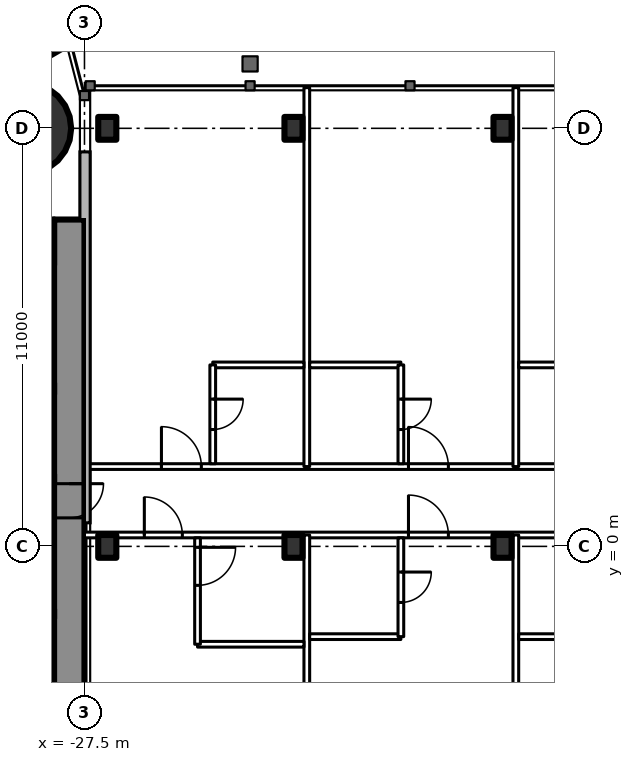
"""IFC4 building model, lengths in metres.
Left out: names, types, materials, properties, quantities, classifications, styles, units other than length and angle.
Written with IfcOpenShell. Run it as: python <this file> out.ifc"""

import sys

from ifc_helpers import new_model, si_unit, direction, frame, frame_2d, origin, origin_2d, place, context, subcontext, project, spatial, rectangle, circle, i_section, extrude, element, fill, save


model = new_model("IFC4")
c1 = context("Model", 3, precision=1e-05, world=origin(), true_north=direction((0.0, 1.0)))
c2 = subcontext(c1, "Body", "Model", "MODEL_VIEW")
j1 = project(units=[si_unit("LENGTHUNIT", "METRE"), si_unit("PLANEANGLEUNIT", "RADIAN")], contexts=[c1])
p1 = place(None, origin())
s1 = spatial("IfcSite", under=j1, at=p1, CompositionType="ELEMENT")
p2 = place(p1, origin())
s2 = spatial("IfcBuilding", under=s1, at=p2, CompositionType="ELEMENT")
p3 = place(p2, frame((0.0, 0.0, 218.9)))
s3 = spatial("IfcBuildingStorey", under=s2, at=p3, CompositionType="ELEMENT", Elevation=218.9)
p4 = place(p3, frame((-29.05, 11.0, 0.0), z_axis=(0.0, 0.0, 1.0), x_axis=(1.0, 0.0, 0.0)))
e1 = element("IfcColumn", 1, at=p4, inside=s3, PredefinedType="COLUMN", context=c2, shape_type="SweptSolid", body=[
    extrude(circle(Radius=1.2, at=origin_2d()), origin(), (0.0, 0.0, 1.0), 3.6),
])
p5 = place(p3, frame((-27.9, 8.6, 0.0), z_axis=(0.0, 0.0, 1.0), x_axis=(0.0, -1.0, 0.0)))
e2 = element("IfcWall", 2, at=p5, inside=s3, PredefinedType="SHEAR", context=c2, shape_type="SweptSolid", body=[
    extrude(rectangle(XDim=17.2, YDim=0.8, at=frame_2d((8.6, 0.0))), origin(), (0.0, 0.0, 1.0), 3.6),
])
p6 = place(p5, frame((6.95, 0.0, 0.0)))
e3 = element("IfcOpeningElement", 3, at=p6, cuts=e2, PredefinedType="OPENING", context=c2, shape_type="SweptSolid", body=[
    extrude(rectangle(XDim=0.9, YDim=2.2, at=frame_2d((0.45, 1.1))), frame((0.0, 0.41, 0.0), z_axis=(0.0, -1.0, 0.0), x_axis=(1.0, 0.0, 0.0)), (0.0, 0.0, 1.0), 0.82),
])
p7 = place(p3, frame((-28.3, 8.0, 0.0), z_axis=(0.0, 0.0, 1.0), x_axis=(-1.0, 0.0, 0.0)))
e4 = element("IfcWall", 4, at=p7, inside=s3, PredefinedType="SHEAR", context=c2, shape_type="SweptSolid", body=[
    extrude(rectangle(XDim=8.4, YDim=1.2, at=frame_2d((4.2, 0.0))), origin(), (0.0, 0.0, 1.0), 3.6),
])
p8 = place(p7, frame((0.25, 0.0, 0.0)))
e5 = element("IfcOpeningElement", 5, at=p8, cuts=e4, PredefinedType="OPENING", context=c2, shape_type="SweptSolid", body=[
    extrude(rectangle(XDim=1.0, YDim=2.2, at=frame_2d((0.5, 1.1))), frame((0.0, 0.61, 0.0), z_axis=(0.0, -1.0, 0.0), x_axis=(1.0, 0.0, 0.0)), (0.0, 0.0, 1.0), 1.22),
])
p9 = place(p3, frame((-28.3, 4.15, 0.0), z_axis=(0.0, 0.0, 1.0), x_axis=(-1.0, 0.0, 0.0)))
e6 = element("IfcWall", 6, at=p9, inside=s3, PredefinedType="SHEAR", context=c2, shape_type="SweptSolid", body=[
    extrude(rectangle(XDim=8.4, YDim=0.3, at=frame_2d((4.2, 0.0))), origin(), (0.0, 0.0, 1.0), 3.6),
])
for number, where, z_axis, x_axis in (
    (7, (-28.3, 1.775, 0.0), (0.0, 0.0, 1.0), (-1.0, 0.0, 0.0)),
    (8, (-28.3, -1.775, 0.0), (0.0, 0.0, 1.0), (-1.0, 0.0, 0.0)),
):
    element("IfcWall", number, at=place(p3, frame(where, z_axis=z_axis, x_axis=x_axis)), inside=s3, PredefinedType="SHEAR", context=c2, shape_type="SweptSolid", body=[
        extrude(rectangle(XDim=2.9, YDim=0.25, at=frame_2d((1.45, 0.0))), origin(), (0.0, 0.0, 1.0), 3.6),
    ])
p10 = place(p3, frame((-27.2, 14.3, 0.0), z_axis=(0.0, 0.0, 1.0), x_axis=(-0.866026593062, -0.499997940104, 0.0)))
e9 = element("IfcWall", 9, at=p10, inside=s3, PredefinedType="SHEAR", context=c2, shape_type="SweptSolid", body=[
    extrude(rectangle(XDim=28.946, YDim=1.2, at=frame_2d((14.473, 0.0))), origin(), (0.0, 0.0, 1.0), 3.6),
])
p11 = place(p10, frame((4.6, 0.0, 0.0)))
e10 = element("IfcOpeningElement", 10, at=p11, cuts=e9, PredefinedType="OPENING", context=c2, shape_type="SweptSolid", body=[
    extrude(rectangle(XDim=1.0, YDim=2.2, at=frame_2d((0.5, 1.1))), frame((0.0, 0.61, 0.0), z_axis=(0.0, -1.0, 0.0), x_axis=(1.0, 0.0, 0.0)), (0.0, 0.0, 1.0), 1.22),
])
p12 = place(p10, frame((13.395, 0.0, 0.0)))
e11 = element("IfcOpeningElement", 11, at=p12, cuts=e9, PredefinedType="OPENING", context=c2, shape_type="SweptSolid", body=[
    extrude(rectangle(XDim=1.8, YDim=2.2, at=frame_2d((0.9, 1.1))), frame((0.0, 0.61, 0.0), z_axis=(0.0, -1.0, 0.0), x_axis=(1.0, 0.0, 0.0)), (0.0, 0.0, 1.0), 1.22),
])
p13 = place(p3, frame((-27.2, -14.3, 0.0), z_axis=(0.0, 0.0, 1.0), x_axis=(-0.866024021859, 0.500002393557, 0.0)))
e12 = element("IfcWall", 12, at=p13, inside=s3, PredefinedType="SHEAR", context=c2, shape_type="SweptSolid", body=[
    extrude(rectangle(XDim=27.907, YDim=1.2, at=frame_2d((13.954, 0.0))), origin(), (0.0, 0.0, 1.0), 3.6),
])
p14 = place(p13, frame((4.6, 0.0, 0.0)))
e13 = element("IfcOpeningElement", 13, at=p14, cuts=e12, PredefinedType="OPENING", context=c2, shape_type="SweptSolid", body=[
    extrude(rectangle(XDim=1.0, YDim=2.2, at=frame_2d((0.5, 1.1))), frame((0.0, 0.61, 0.0), z_axis=(0.0, -1.0, 0.0), x_axis=(1.0, 0.0, 0.0)), (0.0, 0.0, 1.0), 1.22),
])
p15 = place(p13, frame((13.395, 0.0, 0.0)))
e14 = element("IfcOpeningElement", 14, at=p15, cuts=e12, PredefinedType="OPENING", context=c2, shape_type="SweptSolid", body=[
    extrude(rectangle(XDim=1.8, YDim=2.2, at=frame_2d((0.9, 1.1))), frame((0.0, 0.61, 0.0), z_axis=(0.0, -1.0, 0.0), x_axis=(1.0, 0.0, 0.0)), (0.0, 0.0, 1.0), 1.22),
])
for number, where, z_axis, x_axis in (
    (15, (-26.9, 0.0, 0.0), (0.0, 0.0, 1.0), (1.0, 0.0, 0.0)),
    (16, (-22.0, 0.0, 0.0), (0.0, 0.0, 1.0), (1.0, 0.0, 0.0)),
    (17, (-16.5, 0.0, 0.0), (0.0, 0.0, 1.0), (1.0, 0.0, 0.0)),
    (18, (-26.9, 11.0, 0.0), (0.0, 0.0, 1.0), (1.0, 0.0, 0.0)),
    (19, (-22.0, 11.0, 0.0), (0.0, 0.0, 1.0), (1.0, 0.0, 0.0)),
    (20, (-16.5, 11.0, 0.0), (0.0, 0.0, 1.0), (1.0, 0.0, 0.0)),
):
    element("IfcColumn", number, at=place(p3, frame(where, z_axis=z_axis, x_axis=x_axis)), inside=s3, PredefinedType="COLUMN", context=c2, shape_type="SweptSolid", body=[
        extrude(i_section(OverallWidth=0.476, OverallDepth=0.6, WebThickness=0.1, FlangeThickness=0.14, FilletRadius=0.02, at=origin_2d()), origin(), (0.0, 0.0, 1.0), 3.6),
    ])
p16 = place(p3, frame((-27.5, 0.3, 0.0), z_axis=(0.0, 0.0, 1.0), x_axis=(1.0, 0.0, 0.0)))
e21 = element("IfcWall", 21, at=p16, inside=s3, PredefinedType="PARTITIONING", context=c2, shape_type="SweptSolid", body=[
    extrude(rectangle(XDim=55.0, YDim=0.15, at=frame_2d((27.5, 0.0))), origin(), (0.0, 0.0, 1.0), 2.4),
])
p17 = place(p16, frame((1.575, 0.0, 0.0)))
e22 = element("IfcOpeningElement", 22, at=p17, cuts=e21, PredefinedType="OPENING", context=c2, shape_type="SweptSolid", body=[
    extrude(rectangle(XDim=1.0, YDim=2.2, at=frame_2d((0.5, 1.1))), frame((0.0, 0.085, 0.0), z_axis=(0.0, -1.0, 0.0), x_axis=(1.0, 0.0, 0.0)), (0.0, 0.0, 1.0), 0.17),
])
p18 = place(p16, frame((8.525, 0.0, 0.0)))
e23 = element("IfcOpeningElement", 23, at=p18, cuts=e21, PredefinedType="OPENING", context=c2, shape_type="SweptSolid", body=[
    extrude(rectangle(XDim=1.05, YDim=2.4, at=frame_2d((0.525, 1.2))), frame((0.0, 0.085, 0.0), z_axis=(0.0, -1.0, 0.0), x_axis=(1.0, 0.0, 0.0)), (0.0, 0.0, 1.0), 0.17),
])
p19 = place(p16, frame((14.025, 0.0, 0.0)))
e24 = element("IfcOpeningElement", 24, at=p19, cuts=e21, PredefinedType="OPENING", context=c2, shape_type="SweptSolid", body=[
    extrude(rectangle(XDim=1.05, YDim=2.4, at=frame_2d((0.525, 1.2))), frame((0.0, 0.085, 0.0), z_axis=(0.0, -1.0, 0.0), x_axis=(1.0, 0.0, 0.0)), (0.0, 0.0, 1.0), 0.17),
])
p20 = place(p16, frame((19.525, 0.0, 0.0)))
e25 = element("IfcOpeningElement", 25, at=p20, cuts=e21, PredefinedType="OPENING", context=c2, shape_type="SweptSolid", body=[
    extrude(rectangle(XDim=1.05, YDim=2.4, at=frame_2d((0.525, 1.2))), frame((0.0, 0.085, 0.0), z_axis=(0.0, -1.0, 0.0), x_axis=(1.0, 0.0, 0.0)), (0.0, 0.0, 1.0), 0.17),
])
p21 = place(p16, frame((25.025, 0.0, 0.0)))
e26 = element("IfcOpeningElement", 26, at=p21, cuts=e21, PredefinedType="OPENING", context=c2, shape_type="SweptSolid", body=[
    extrude(rectangle(XDim=1.05, YDim=2.4, at=frame_2d((0.525, 1.2))), frame((0.0, 0.085, 0.0), z_axis=(0.0, -1.0, 0.0), x_axis=(1.0, 0.0, 0.0)), (0.0, 0.0, 1.0), 0.17),
])
p22 = place(p16, frame((30.525, 0.0, 0.0)))
e27 = element("IfcOpeningElement", 27, at=p22, cuts=e21, PredefinedType="OPENING", context=c2, shape_type="SweptSolid", body=[
    extrude(rectangle(XDim=1.05, YDim=2.4, at=frame_2d((0.525, 1.2))), frame((0.0, 0.085, 0.0), z_axis=(0.0, -1.0, 0.0), x_axis=(1.0, 0.0, 0.0)), (0.0, 0.0, 1.0), 0.17),
])
p23 = place(p16, frame((36.025, 0.0, 0.0)))
e28 = element("IfcOpeningElement", 28, at=p23, cuts=e21, PredefinedType="OPENING", context=c2, shape_type="SweptSolid", body=[
    extrude(rectangle(XDim=1.05, YDim=2.4, at=frame_2d((0.525, 1.2))), frame((0.0, 0.085, 0.0), z_axis=(0.0, -1.0, 0.0), x_axis=(1.0, 0.0, 0.0)), (0.0, 0.0, 1.0), 0.17),
])
p24 = place(p16, frame((41.525, 0.0, 0.0)))
e29 = element("IfcOpeningElement", 29, at=p24, cuts=e21, PredefinedType="OPENING", context=c2, shape_type="SweptSolid", body=[
    extrude(rectangle(XDim=1.05, YDim=2.4, at=frame_2d((0.525, 1.2))), frame((0.0, 0.085, 0.0), z_axis=(0.0, -1.0, 0.0), x_axis=(1.0, 0.0, 0.0)), (0.0, 0.0, 1.0), 0.17),
])
p25 = place(p16, frame((47.025, 0.0, 0.0)))
e30 = element("IfcOpeningElement", 30, at=p25, cuts=e21, PredefinedType="OPENING", context=c2, shape_type="SweptSolid", body=[
    extrude(rectangle(XDim=1.05, YDim=2.4, at=frame_2d((0.525, 1.2))), frame((0.0, 0.085, 0.0), z_axis=(0.0, -1.0, 0.0), x_axis=(1.0, 0.0, 0.0)), (0.0, 0.0, 1.0), 0.17),
])
p26 = place(p16, frame((52.525, 0.0, 0.0)))
e31 = element("IfcOpeningElement", 31, at=p26, cuts=e21, PredefinedType="OPENING", context=c2, shape_type="SweptSolid", body=[
    extrude(rectangle(XDim=1.05, YDim=2.4, at=frame_2d((0.525, 1.2))), frame((0.0, 0.085, 0.0), z_axis=(0.0, -1.0, 0.0), x_axis=(1.0, 0.0, 0.0)), (0.0, 0.0, 1.0), 0.17),
])
p27 = place(p3, frame((-27.5, 2.1, 0.0), z_axis=(0.0, 0.0, 1.0), x_axis=(1.0, 0.0, 0.0)))
e32 = element("IfcWall", 32, at=p27, inside=s3, PredefinedType="PARTITIONING", context=c2, shape_type="SweptSolid", body=[
    extrude(rectangle(XDim=55.0, YDim=0.15, at=frame_2d((27.5, 0.0))), origin(), (0.0, 0.0, 1.0), 3.4),
])
p28 = place(p27, frame((2.025, 0.0, 0.0)))
e33 = element("IfcOpeningElement", 33, at=p28, cuts=e32, PredefinedType="OPENING", context=c2, shape_type="SweptSolid", body=[
    extrude(rectangle(XDim=1.05, YDim=2.4, at=frame_2d((0.525, 1.2))), frame((0.0, 0.085, 0.0), z_axis=(0.0, -1.0, 0.0), x_axis=(1.0, 0.0, 0.0)), (0.0, 0.0, 1.0), 0.17),
])
p29 = place(p27, frame((8.525, 0.0, 0.0)))
e34 = element("IfcOpeningElement", 34, at=p29, cuts=e32, PredefinedType="OPENING", context=c2, shape_type="SweptSolid", body=[
    extrude(rectangle(XDim=1.05, YDim=2.4, at=frame_2d((0.525, 1.2))), frame((0.0, 0.085, 0.0), z_axis=(0.0, -1.0, 0.0), x_axis=(1.0, 0.0, 0.0)), (0.0, 0.0, 1.0), 0.17),
])
p30 = place(p27, frame((14.025, 0.0, 0.0)))
e35 = element("IfcOpeningElement", 35, at=p30, cuts=e32, PredefinedType="OPENING", context=c2, shape_type="SweptSolid", body=[
    extrude(rectangle(XDim=1.05, YDim=2.4, at=frame_2d((0.525, 1.2))), frame((0.0, 0.085, 0.0), z_axis=(0.0, -1.0, 0.0), x_axis=(1.0, 0.0, 0.0)), (0.0, 0.0, 1.0), 0.17),
])
p31 = place(p27, frame((19.525, 0.0, 0.0)))
e36 = element("IfcOpeningElement", 36, at=p31, cuts=e32, PredefinedType="OPENING", context=c2, shape_type="SweptSolid", body=[
    extrude(rectangle(XDim=1.05, YDim=2.4, at=frame_2d((0.525, 1.2))), frame((0.0, 0.085, 0.0), z_axis=(0.0, -1.0, 0.0), x_axis=(1.0, 0.0, 0.0)), (0.0, 0.0, 1.0), 0.17),
])
p32 = place(p27, frame((25.025, 0.0, 0.0)))
e37 = element("IfcOpeningElement", 37, at=p32, cuts=e32, PredefinedType="OPENING", context=c2, shape_type="SweptSolid", body=[
    extrude(rectangle(XDim=1.05, YDim=2.4, at=frame_2d((0.525, 1.2))), frame((0.0, 0.085, 0.0), z_axis=(0.0, -1.0, 0.0), x_axis=(1.0, 0.0, 0.0)), (0.0, 0.0, 1.0), 0.17),
])
p33 = place(p27, frame((30.525, 0.0, 0.0)))
e38 = element("IfcOpeningElement", 38, at=p33, cuts=e32, PredefinedType="OPENING", context=c2, shape_type="SweptSolid", body=[
    extrude(rectangle(XDim=1.05, YDim=2.4, at=frame_2d((0.525, 1.2))), frame((0.0, 0.085, 0.0), z_axis=(0.0, -1.0, 0.0), x_axis=(1.0, 0.0, 0.0)), (0.0, 0.0, 1.0), 0.17),
])
p34 = place(p27, frame((36.025, 0.0, 0.0)))
e39 = element("IfcOpeningElement", 39, at=p34, cuts=e32, PredefinedType="OPENING", context=c2, shape_type="SweptSolid", body=[
    extrude(rectangle(XDim=1.05, YDim=2.4, at=frame_2d((0.525, 1.2))), frame((0.0, 0.085, 0.0), z_axis=(0.0, -1.0, 0.0), x_axis=(1.0, 0.0, 0.0)), (0.0, 0.0, 1.0), 0.17),
])
p35 = place(p27, frame((41.525, 0.0, 0.0)))
e40 = element("IfcOpeningElement", 40, at=p35, cuts=e32, PredefinedType="OPENING", context=c2, shape_type="SweptSolid", body=[
    extrude(rectangle(XDim=1.05, YDim=2.4, at=frame_2d((0.525, 1.2))), frame((0.0, 0.085, 0.0), z_axis=(0.0, -1.0, 0.0), x_axis=(1.0, 0.0, 0.0)), (0.0, 0.0, 1.0), 0.17),
])
p36 = place(p27, frame((47.025, 0.0, 0.0)))
e41 = element("IfcOpeningElement", 41, at=p36, cuts=e32, PredefinedType="OPENING", context=c2, shape_type="SweptSolid", body=[
    extrude(rectangle(XDim=1.05, YDim=2.4, at=frame_2d((0.525, 1.2))), frame((0.0, 0.085, 0.0), z_axis=(0.0, -1.0, 0.0), x_axis=(1.0, 0.0, 0.0)), (0.0, 0.0, 1.0), 0.17),
])
p37 = place(p27, frame((52.525, 0.0, 0.0)))
e42 = element("IfcOpeningElement", 42, at=p37, cuts=e32, PredefinedType="OPENING", context=c2, shape_type="SweptSolid", body=[
    extrude(rectangle(XDim=1.05, YDim=2.4, at=frame_2d((0.525, 1.2))), frame((0.0, 0.085, 0.0), z_axis=(0.0, -1.0, 0.0), x_axis=(1.0, 0.0, 0.0)), (0.0, 0.0, 1.0), 0.17),
])
for number, where, z_axis, x_axis in (
    (43, (-21.65, -12.07, 0.0), (0.0, 0.0, 1.0), (0.0, 1.0, 0.0)),
    (44, (-16.15, -12.07, 0.0), (0.0, 0.0, 1.0), (0.0, 1.0, 0.0)),
):
    element("IfcWall", number, at=place(p3, frame(where, z_axis=z_axis, x_axis=x_axis)), inside=s3, PredefinedType="PARTITIONING", context=c2, shape_type="SweptSolid", body=[
        extrude(rectangle(XDim=12.37, YDim=0.15, at=frame_2d((6.185, 0.0))), origin(), (0.0, 0.0, 1.0), 3.4),
    ])
p38 = place(p3, frame((-24.525, -2.575, 0.0), z_axis=(0.0, 0.0, 1.0), x_axis=(1.0, 0.0, 0.0)))
e45 = element("IfcWall", 45, at=p38, inside=s3, PredefinedType="PARTITIONING", context=c2, shape_type="SweptSolid", body=[
    extrude(rectangle(XDim=2.8, YDim=0.15, at=frame_2d((1.4, 0.0))), origin(), (0.0, 0.0, 1.0), 3.4),
])
p39 = place(p3, frame((-24.525, -2.575, 0.0), z_axis=(0.0, 0.0, 1.0), x_axis=(0.0, 1.0, 0.0)))
e46 = element("IfcWall", 46, at=p39, inside=s3, PredefinedType="PARTITIONING", context=c2, shape_type="SweptSolid", body=[
    extrude(rectangle(XDim=2.8, YDim=0.15, at=frame_2d((1.4, 0.0))), origin(), (0.0, 0.0, 1.0), 3.4),
])
p40 = place(p39, frame((1.55, 0.0, 0.0)))
e47 = element("IfcOpeningElement", 47, at=p40, cuts=e46, PredefinedType="OPENING", context=c2, shape_type="SweptSolid", body=[
    extrude(rectangle(XDim=1.0, YDim=2.2, at=frame_2d((0.5, 1.1))), frame((0.0, 0.085, 0.0), z_axis=(0.0, -1.0, 0.0), x_axis=(1.0, 0.0, 0.0)), (0.0, 0.0, 1.0), 0.17),
])
p41 = place(p3, frame((-21.575, -2.375, 0.0), z_axis=(0.0, 0.0, 1.0), x_axis=(1.0, 0.0, 0.0)))
e48 = element("IfcWall", 48, at=p41, inside=s3, PredefinedType="PARTITIONING", context=c2, shape_type="SweptSolid", body=[
    extrude(rectangle(XDim=2.4, YDim=0.15, at=frame_2d((1.2, 0.0))), origin(), (0.0, 0.0, 1.0), 3.4),
])
p42 = place(p3, frame((-19.175, -2.375, 0.0), z_axis=(0.0, 0.0, 1.0), x_axis=(0.0, 1.0, 0.0)))
e49 = element("IfcWall", 49, at=p42, inside=s3, PredefinedType="PARTITIONING", context=c2, shape_type="SweptSolid", body=[
    extrude(rectangle(XDim=2.6, YDim=0.15, at=frame_2d((1.3, 0.0))), origin(), (0.0, 0.0, 1.0), 3.4),
])
p43 = place(p42, frame((0.9, 0.0, 0.0)))
e50 = element("IfcOpeningElement", 50, at=p43, cuts=e49, PredefinedType="OPENING", context=c2, shape_type="SweptSolid", body=[
    extrude(rectangle(XDim=0.8, YDim=2.2, at=frame_2d((0.4, 1.1))), frame((0.0, 0.085, 0.0), z_axis=(0.0, -1.0, 0.0), x_axis=(1.0, 0.0, 0.0)), (0.0, 0.0, 1.0), 0.17),
])
p44 = place(p3, frame((-16.075, -2.375, 0.0), z_axis=(0.0, 0.0, 1.0), x_axis=(1.0, 0.0, 0.0)))
e51 = element("IfcWall", 51, at=p44, inside=s3, PredefinedType="PARTITIONING", context=c2, shape_type="SweptSolid", body=[
    extrude(rectangle(XDim=2.4, YDim=0.15, at=frame_2d((1.2, 0.0))), origin(), (0.0, 0.0, 1.0), 3.4),
])
for number, where, z_axis, x_axis in (
    (52, (-21.65, 2.1, 0.0), (0.0, 0.0, 1.0), (0.0, 1.0, 0.0)),
    (53, (-16.15, 2.1, 0.0), (0.0, 0.0, 1.0), (0.0, 1.0, 0.0)),
):
    element("IfcWall", number, at=place(p3, frame(where, z_axis=z_axis, x_axis=x_axis)), inside=s3, PredefinedType="PARTITIONING", context=c2, shape_type="SweptSolid", body=[
        extrude(rectangle(XDim=9.97, YDim=0.15, at=frame_2d((4.985, 0.0))), origin(), (0.0, 0.0, 1.0), 3.4),
    ])
p45 = place(p3, frame((-24.125, 4.775, 0.0), z_axis=(0.0, 0.0, 1.0), x_axis=(1.0, 0.0, 0.0)))
e54 = element("IfcWall", 54, at=p45, inside=s3, PredefinedType="PARTITIONING", context=c2, shape_type="SweptSolid", body=[
    extrude(rectangle(XDim=2.4, YDim=0.15, at=frame_2d((1.2, 0.0))), origin(), (0.0, 0.0, 1.0), 3.4),
])
p46 = place(p3, frame((-24.125, 2.175, 0.0), z_axis=(0.0, 0.0, 1.0), x_axis=(0.0, 1.0, 0.0)))
e55 = element("IfcWall", 55, at=p46, inside=s3, PredefinedType="PARTITIONING", context=c2, shape_type="SweptSolid", body=[
    extrude(rectangle(XDim=2.6, YDim=0.15, at=frame_2d((1.3, 0.0))), origin(), (0.0, 0.0, 1.0), 3.4),
])
p47 = place(p46, frame((0.9, 0.0, 0.0)))
e56 = element("IfcOpeningElement", 56, at=p47, cuts=e55, PredefinedType="OPENING", context=c2, shape_type="SweptSolid", body=[
    extrude(rectangle(XDim=0.8, YDim=2.2, at=frame_2d((0.4, 1.1))), frame((0.0, 0.085, 0.0), z_axis=(0.0, -1.0, 0.0), x_axis=(1.0, 0.0, 0.0)), (0.0, 0.0, 1.0), 0.17),
])
p48 = place(p3, frame((-21.575, 4.775, 0.0), z_axis=(0.0, 0.0, 1.0), x_axis=(1.0, 0.0, 0.0)))
e57 = element("IfcWall", 57, at=p48, inside=s3, PredefinedType="PARTITIONING", context=c2, shape_type="SweptSolid", body=[
    extrude(rectangle(XDim=2.4, YDim=0.15, at=frame_2d((1.2, 0.0))), origin(), (0.0, 0.0, 1.0), 3.4),
])
p49 = place(p3, frame((-19.175, 2.175, 0.0), z_axis=(0.0, 0.0, 1.0), x_axis=(0.0, 1.0, 0.0)))
e58 = element("IfcWall", 58, at=p49, inside=s3, PredefinedType="PARTITIONING", context=c2, shape_type="SweptSolid", body=[
    extrude(rectangle(XDim=2.6, YDim=0.15, at=frame_2d((1.3, 0.0))), origin(), (0.0, 0.0, 1.0), 3.4),
])
p50 = place(p49, frame((0.9, 0.0, 0.0)))
e59 = element("IfcOpeningElement", 59, at=p50, cuts=e58, PredefinedType="OPENING", context=c2, shape_type="SweptSolid", body=[
    extrude(rectangle(XDim=0.8, YDim=2.2, at=frame_2d((0.4, 1.1))), frame((0.0, 0.085, 0.0), z_axis=(0.0, -1.0, 0.0), x_axis=(1.0, 0.0, 0.0)), (0.0, 0.0, 1.0), 0.17),
])
p51 = place(p3, frame((-16.075, 4.775, 0.0), z_axis=(0.0, 0.0, 1.0), x_axis=(1.0, 0.0, 0.0)))
e60 = element("IfcWall", 60, at=p51, inside=s3, PredefinedType="PARTITIONING", context=c2, shape_type="SweptSolid", body=[
    extrude(rectangle(XDim=2.4, YDim=0.15, at=frame_2d((1.2, 0.0))), origin(), (0.0, 0.0, 1.0), 3.4),
])
p52 = place(p6, origin())
e61 = element("IfcDoor", 61, at=p52, inside=s3, OperationType="SINGLE_SWING_LEFT", PredefinedType="DOOR", context=c2, shape_type="SweptSolid", body=[
    extrude(rectangle(XDim=0.9, YDim=2.2, at=frame_2d((0.45, 1.1))), frame((0.0, 0.025, 0.0), z_axis=(0.0, -1.0, 0.0), x_axis=(1.0, 0.0, 0.0)), (0.0, 0.0, 1.0), 0.05),
])
fill(e3, e61)
p53 = place(p40, origin())
e62 = element("IfcDoor", 62, at=p53, inside=s3, OperationType="SINGLE_SWING_RIGHT", PredefinedType="DOOR", context=c2, shape_type="SweptSolid", body=[
    extrude(rectangle(XDim=1.0, YDim=2.2, at=frame_2d((0.5, 1.1))), frame((0.0, 0.025, 0.0), z_axis=(0.0, -1.0, 0.0), x_axis=(1.0, 0.0, 0.0)), (0.0, 0.0, 1.0), 0.05),
])
fill(e47, e62)
p54 = place(p17, origin())
e63 = element("IfcDoor", 63, at=p54, inside=s3, OperationType="SINGLE_SWING_LEFT", PredefinedType="DOOR", context=c2, shape_type="SweptSolid", body=[
    extrude(rectangle(XDim=1.0, YDim=2.2, at=frame_2d((0.5, 1.1))), frame((0.0, 0.025, 0.0), z_axis=(0.0, -1.0, 0.0), x_axis=(1.0, 0.0, 0.0)), (0.0, 0.0, 1.0), 0.05),
])
fill(e22, e63)
p55 = place(p43, origin())
e64 = element("IfcDoor", 64, at=p55, inside=s3, OperationType="SINGLE_SWING_RIGHT", PredefinedType="DOOR", context=c2, shape_type="SweptSolid", body=[
    extrude(rectangle(XDim=0.8, YDim=2.2, at=frame_2d((0.4, 1.1))), frame((0.0, 0.025, 0.0), z_axis=(0.0, -1.0, 0.0), x_axis=(1.0, 0.0, 0.0)), (0.0, 0.0, 1.0), 0.05),
])
fill(e50, e64)
p56 = place(p18, origin())
e65 = element("IfcDoor", 65, at=p56, inside=s3, OperationType="SINGLE_SWING_LEFT", PredefinedType="DOOR", context=c2, shape_type="SweptSolid", body=[
    extrude(rectangle(XDim=1.05, YDim=2.4, at=frame_2d((0.525, 1.2))), frame((0.0, 0.025, 0.0), z_axis=(0.0, -1.0, 0.0), x_axis=(1.0, 0.0, 0.0)), (0.0, 0.0, 1.0), 0.05),
])
fill(e23, e65)
p57 = place(p47, origin())
e66 = element("IfcDoor", 66, at=p57, inside=s3, OperationType="SINGLE_SWING_RIGHT", PredefinedType="DOOR", context=c2, shape_type="SweptSolid", body=[
    extrude(rectangle(XDim=0.8, YDim=2.2, at=frame_2d((0.4, 1.1))), frame((0.0, 0.025, 0.0), z_axis=(0.0, -1.0, 0.0), x_axis=(1.0, 0.0, 0.0)), (0.0, 0.0, 1.0), 0.05),
])
fill(e56, e66)
p58 = place(p28, origin())
e67 = element("IfcDoor", 67, at=p58, inside=s3, OperationType="SINGLE_SWING_LEFT", PredefinedType="DOOR", context=c2, shape_type="SweptSolid", body=[
    extrude(rectangle(XDim=1.05, YDim=2.4, at=frame_2d((0.525, 1.2))), frame((0.0, 0.025, 0.0), z_axis=(0.0, -1.0, 0.0), x_axis=(1.0, 0.0, 0.0)), (0.0, 0.0, 1.0), 0.05),
])
fill(e33, e67)
p59 = place(p50, origin())
e68 = element("IfcDoor", 68, at=p59, inside=s3, OperationType="SINGLE_SWING_RIGHT", PredefinedType="DOOR", context=c2, shape_type="SweptSolid", body=[
    extrude(rectangle(XDim=0.8, YDim=2.2, at=frame_2d((0.4, 1.1))), frame((0.0, 0.025, 0.0), z_axis=(0.0, -1.0, 0.0), x_axis=(1.0, 0.0, 0.0)), (0.0, 0.0, 1.0), 0.05),
])
fill(e59, e68)
p60 = place(p29, origin())
e69 = element("IfcDoor", 69, at=p60, inside=s3, OperationType="SINGLE_SWING_LEFT", PredefinedType="DOOR", context=c2, shape_type="SweptSolid", body=[
    extrude(rectangle(XDim=1.05, YDim=2.4, at=frame_2d((0.525, 1.2))), frame((0.0, 0.025, 0.0), z_axis=(0.0, -1.0, 0.0), x_axis=(1.0, 0.0, 0.0)), (0.0, 0.0, 1.0), 0.05),
])
fill(e34, e69)
save(model, sys.argv[1])
